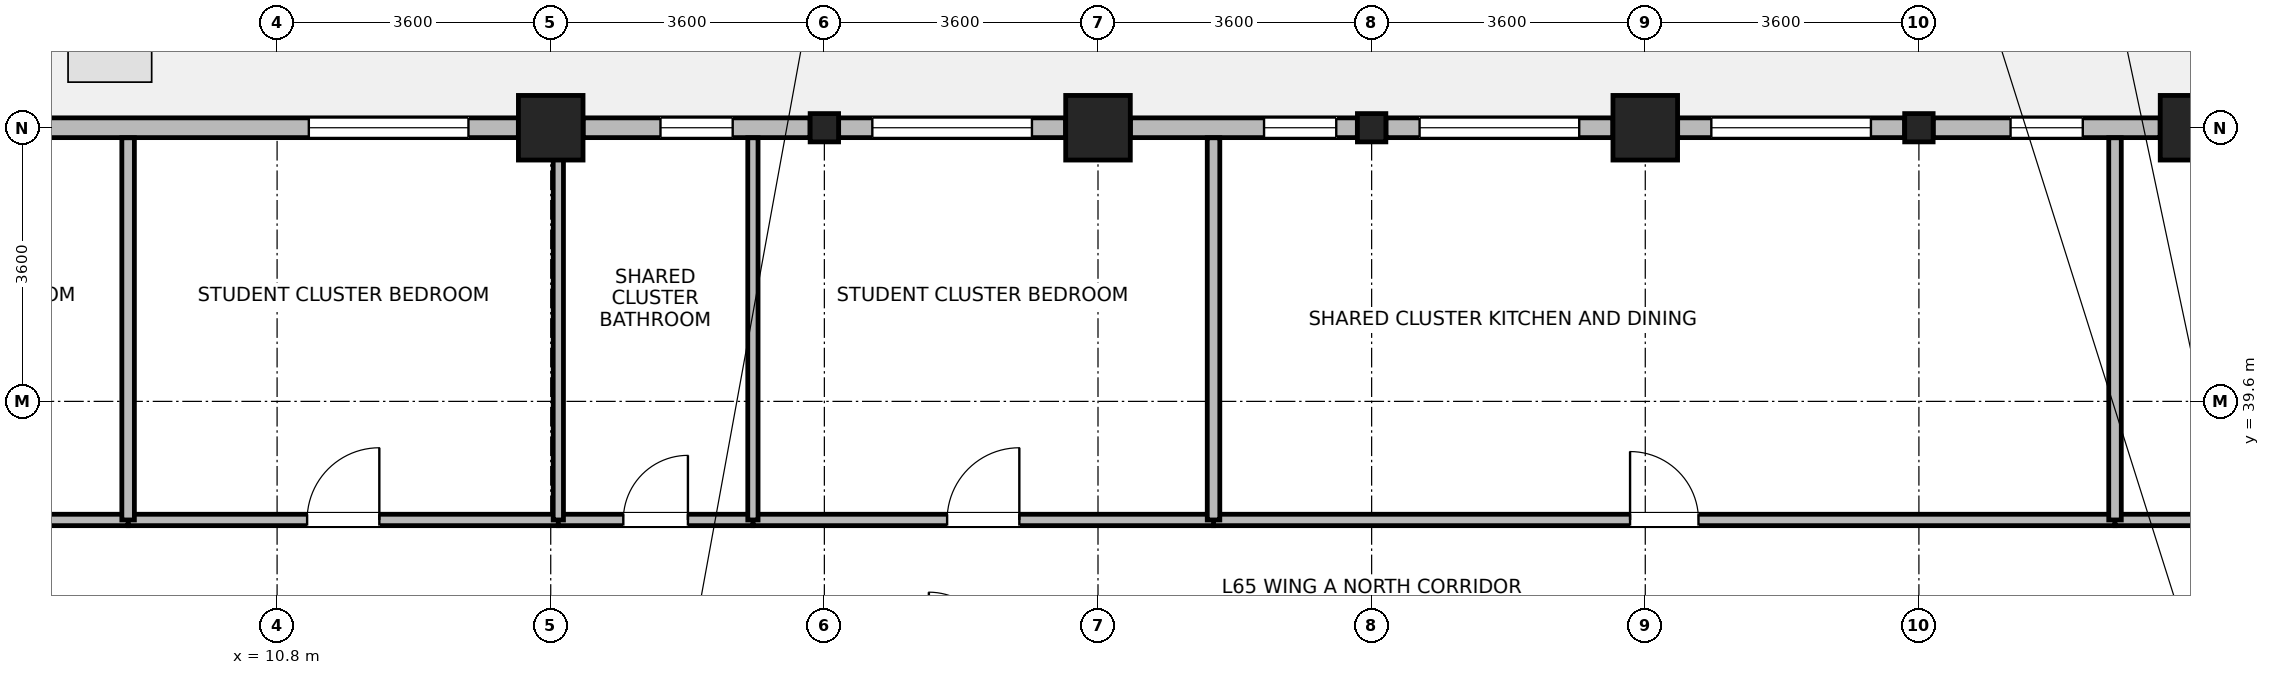
"""IFC4 building model, lengths in metres.
Left out: names, types, materials, properties, quantities, classifications, styles, units other than length and angle.
Written with IfcOpenShell. Run it as: python <this file> out.ifc"""

import sys

from ifc_helpers import new_model, si_unit, direction, frame, frame_2d, origin, origin_2d, place, context, subcontext, project, spatial, rectangle, i_section, extrude, source, transform, mapped, element, fill, save


model = new_model("IFC4")
c1 = context("Model", 3, precision=1e-05, world=origin(), true_north=direction((0.0, 1.0)))
c2 = subcontext(c1, "Body", "Model", "MODEL_VIEW")
j1 = project(units=[si_unit("LENGTHUNIT", "METRE"), si_unit("PLANEANGLEUNIT", "RADIAN")], contexts=[c1])
p1 = place(None, origin())
s1 = spatial("IfcSite", under=j1, at=p1, CompositionType="ELEMENT")
p2 = place(p1, origin())
s2 = spatial("IfcBuilding", under=s1, at=p2, CompositionType="ELEMENT")
p3 = place(p2, frame((0.0, 0.0, 253.6)))
s3 = spatial("IfcBuildingStorey", under=s2, at=p3, CompositionType="ELEMENT", Elevation=253.6)
m1 = source(origin(), c2, "Body", "SweptSolid", [
    extrude(rectangle(XDim=0.85, YDim=0.85, at=origin_2d()), origin(), (0.0, 0.0, 1.0), 3.7),
])
for number, where, z_axis, x_axis in (
    (1, (14.4, 43.2, 0.0), (0.0, 0.0, 1.0), (1.0, 0.0, 0.0)),
    (2, (21.6, 43.2, 0.0), (0.0, 0.0, 1.0), (1.0, 0.0, 0.0)),
    (3, (28.8, 43.2, 0.0), (0.0, 0.0, 1.0), (1.0, 0.0, 0.0)),
    (4, (36.0, 43.2, 0.0), (0.0, 0.0, 1.0), (1.0, 0.0, 0.0)),
):
    element("IfcColumn", number, at=place(p3, frame(where, z_axis=z_axis, x_axis=x_axis)), inside=s3, PredefinedType="COLUMN", context=c2, shape_type="MappedRepresentation", body=[
        mapped(m1, transform((0.0, 0.0, 0.0), x_axis=(1.0, 0.0, 0.0), y_axis=(0.0, 1.0, 0.0), z_axis=(0.0, 0.0, 1.0), scale=1.0)),
    ])
m2 = source(origin(), c2, "Body", "SweptSolid", [
    extrude(i_section(OverallWidth=0.374, OverallDepth=0.372, WebThickness=0.015, FlangeThickness=0.026, FilletRadius=0.015, at=origin_2d()), origin(), (0.0, 0.0, 1.0), 3.7),
])
for number, where, z_axis, x_axis in (
    (5, (18.0, 43.2, 0.0), (0.0, 0.0, 1.0), (1.0, 0.0, 0.0)),
    (6, (25.2, 43.2, 0.0), (0.0, 0.0, 1.0), (1.0, 0.0, 0.0)),
    (7, (32.4, 43.2, 0.0), (0.0, 0.0, 1.0), (1.0, 0.0, 0.0)),
):
    element("IfcColumn", number, at=place(p3, frame(where, z_axis=z_axis, x_axis=x_axis)), inside=s3, PredefinedType="COLUMN", context=c2, shape_type="MappedRepresentation", body=[
        mapped(m2, transform((0.0, 0.0, 0.0), x_axis=(1.0, 0.0, 0.0), y_axis=(0.0, 1.0, 0.0), z_axis=(0.0, 0.0, 1.0), scale=1.0)),
    ])
p4 = place(p3, frame((32.588, 43.2, 0.0), z_axis=(0.0, 0.0, 1.0), x_axis=(1.0, 0.0, 0.0)))
e8 = element("IfcWall", 8, at=p4, inside=s3, PredefinedType="STANDARD", context=c2, shape_type="SweptSolid", body=[
    extrude(rectangle(XDim=2.986, YDim=0.26, at=frame_2d((1.493, 0.0))), origin(), (0.0, 0.0, 1.0), 3.055),
])
p5 = place(p4, frame((1.018, 0.0, 0.85)))
e9 = element("IfcOpeningElement", 9, at=p5, cuts=e8, PredefinedType="OPENING", context=c2, shape_type="SweptSolid", body=[
    extrude(rectangle(XDim=0.95, YDim=1.75, at=frame_2d((0.475, 0.875))), frame((0.0, 0.14, 0.0), z_axis=(0.0, -1.0, 0.0), x_axis=(1.0, 0.0, 0.0)), (0.0, 0.0, 1.0), 0.28),
])
p6 = place(p3, frame((29.226, 43.2, 0.0), z_axis=(0.0, 0.0, 1.0), x_axis=(1.0, 0.0, 0.0)))
e10 = element("IfcWall", 10, at=p6, inside=s3, PredefinedType="STANDARD", context=c2, shape_type="SweptSolid", body=[
    extrude(rectangle(XDim=2.986, YDim=0.26, at=frame_2d((1.493, 0.0))), origin(), (0.0, 0.0, 1.0), 3.055),
])
p7 = place(p6, frame((0.443, 0.0, 0.85)))
e11 = element("IfcOpeningElement", 11, at=p7, cuts=e10, PredefinedType="OPENING", context=c2, shape_type="SweptSolid", body=[
    extrude(rectangle(XDim=2.1, YDim=1.95, at=frame_2d((1.05, 0.975))), frame((0.0, 0.14, 0.0), z_axis=(0.0, -1.0, 0.0), x_axis=(1.0, 0.0, 0.0)), (0.0, 0.0, 1.0), 0.28),
])
p8 = place(p3, frame((25.388, 43.2, 0.0), z_axis=(0.0, 0.0, 1.0), x_axis=(1.0, 0.0, 0.0)))
e12 = element("IfcWall", 12, at=p8, inside=s3, PredefinedType="STANDARD", context=c2, shape_type="SweptSolid", body=[
    extrude(rectangle(XDim=2.986, YDim=0.26, at=frame_2d((1.493, 0.0))), origin(), (0.0, 0.0, 1.0), 3.055),
])
p9 = place(p8, frame((0.443, 0.0, 0.85)))
e13 = element("IfcOpeningElement", 13, at=p9, cuts=e12, PredefinedType="OPENING", context=c2, shape_type="SweptSolid", body=[
    extrude(rectangle(XDim=2.1, YDim=1.95, at=frame_2d((1.05, 0.975))), frame((0.0, 0.14, 0.0), z_axis=(0.0, -1.0, 0.0), x_axis=(1.0, 0.0, 0.0)), (0.0, 0.0, 1.0), 0.28),
])
p10 = place(p3, frame((22.026, 43.2, 0.0), z_axis=(0.0, 0.0, 1.0), x_axis=(1.0, 0.0, 0.0)))
e14 = element("IfcWall", 14, at=p10, inside=s3, PredefinedType="STANDARD", context=c2, shape_type="SweptSolid", body=[
    extrude(rectangle(XDim=2.986, YDim=0.26, at=frame_2d((1.493, 0.0))), origin(), (0.0, 0.0, 1.0), 3.055),
])
p11 = place(p10, frame((1.759, 0.0, 0.85)))
e15 = element("IfcOpeningElement", 15, at=p11, cuts=e14, PredefinedType="OPENING", context=c2, shape_type="SweptSolid", body=[
    extrude(rectangle(XDim=0.95, YDim=1.75, at=frame_2d((0.475, 0.875))), frame((0.0, 0.14, 0.0), z_axis=(0.0, -1.0, 0.0), x_axis=(1.0, 0.0, 0.0)), (0.0, 0.0, 1.0), 0.28),
])
p12 = place(p3, frame((18.188, 43.2, 0.0), z_axis=(0.0, 0.0, 1.0), x_axis=(1.0, 0.0, 0.0)))
e16 = element("IfcWall", 16, at=p12, inside=s3, PredefinedType="STANDARD", context=c2, shape_type="SweptSolid", body=[
    extrude(rectangle(XDim=2.986, YDim=0.26, at=frame_2d((1.493, 0.0))), origin(), (0.0, 0.0, 1.0), 3.055),
])
p13 = place(p12, frame((0.443, 0.0, 0.85)))
e17 = element("IfcOpeningElement", 17, at=p13, cuts=e16, PredefinedType="OPENING", context=c2, shape_type="SweptSolid", body=[
    extrude(rectangle(XDim=2.1, YDim=1.95, at=frame_2d((1.05, 0.975))), frame((0.0, 0.14, 0.0), z_axis=(0.0, -1.0, 0.0), x_axis=(1.0, 0.0, 0.0)), (0.0, 0.0, 1.0), 0.28),
])
p14 = place(p3, frame((14.826, 43.2, 0.0), z_axis=(0.0, 0.0, 1.0), x_axis=(1.0, 0.0, 0.0)))
e18 = element("IfcWall", 18, at=p14, inside=s3, PredefinedType="STANDARD", context=c2, shape_type="SweptSolid", body=[
    extrude(rectangle(XDim=2.986, YDim=0.26, at=frame_2d((1.493, 0.0))), origin(), (0.0, 0.0, 1.0), 3.055),
])
p15 = place(p14, frame((1.018, 0.0, 0.85)))
e19 = element("IfcOpeningElement", 19, at=p15, cuts=e18, PredefinedType="OPENING", context=c2, shape_type="SweptSolid", body=[
    extrude(rectangle(XDim=0.95, YDim=1.75, at=frame_2d((0.475, 0.875))), frame((0.0, 0.14, 0.0), z_axis=(0.0, -1.0, 0.0), x_axis=(1.0, 0.0, 0.0)), (0.0, 0.0, 1.0), 0.28),
])
p16 = place(p3, frame((3.735, 43.2, 0.0), z_axis=(0.0, 0.0, 1.0), x_axis=(1.0, 0.0, 0.0)))
e20 = element("IfcWall", 20, at=p16, inside=s3, PredefinedType="STANDARD", context=c2, shape_type="SweptSolid", body=[
    extrude(rectangle(XDim=10.239, YDim=0.26, at=frame_2d((5.12, 0.0))), origin(), (0.0, 0.0, 1.0), 3.455),
])
p17 = place(p16, frame((0.656, 0.0, 0.85)))
e21 = element("IfcOpeningElement", 21, at=p17, cuts=e20, PredefinedType="OPENING", context=c2, shape_type="SweptSolid", body=[
    extrude(rectangle(XDim=2.1, YDim=1.95, at=frame_2d((1.05, 0.975))), frame((0.0, 0.14, 0.0), z_axis=(0.0, -1.0, 0.0), x_axis=(1.0, 0.0, 0.0)), (0.0, 0.0, 1.0), 0.28),
])
p18 = place(p16, frame((7.482, 0.0, 0.85)))
e22 = element("IfcOpeningElement", 22, at=p18, cuts=e20, PredefinedType="OPENING", context=c2, shape_type="SweptSolid", body=[
    extrude(rectangle(XDim=2.1, YDim=1.95, at=frame_2d((1.05, 0.975))), frame((0.0, 0.14, 0.0), z_axis=(0.0, -1.0, 0.0), x_axis=(1.0, 0.0, 0.0)), (0.0, 0.0, 1.0), 0.28),
])
p19 = place(p3, frame((23.12, 38.04, 0.0), z_axis=(0.0, 0.0, 1.0), x_axis=(1.0, 0.0, 0.0)))
e23 = element("IfcWall", 23, at=p19, inside=s3, PredefinedType="PARTITIONING", context=c2, shape_type="SweptSolid", body=[
    extrude(rectangle(XDim=11.86, YDim=0.15, at=frame_2d((5.93, 0.0))), origin(), (0.0, 0.0, 1.0), 3.455),
])
p20 = place(p19, frame((5.48, 0.0, 0.0)))
e24 = element("IfcOpeningElement", 24, at=p20, cuts=e23, PredefinedType="OPENING", context=c2, shape_type="SweptSolid", body=[
    extrude(rectangle(XDim=0.9, YDim=2.08, at=frame_2d((0.45, 1.04))), frame((0.0, 0.085, 0.0), z_axis=(0.0, -1.0, 0.0), x_axis=(1.0, 0.0, 0.0)), (0.0, 0.0, 1.0), 0.17),
])
p21 = place(p3, frame((34.98, 38.04, 0.0), z_axis=(0.0, 0.0, 1.0), x_axis=(1.0, 0.0, 0.0)))
e25 = element("IfcWall", 25, at=p21, inside=s3, PredefinedType="PARTITIONING", context=c2, shape_type="SweptSolid", body=[
    extrude(rectangle(XDim=9.96, YDim=0.15, at=frame_2d((4.98, 0.0))), origin(), (0.0, 0.0, 1.0), 3.455),
])
p22 = place(p21, frame((4.505, 0.0, 0.0)))
e26 = element("IfcOpeningElement", 26, at=p22, cuts=e25, PredefinedType="OPENING", context=c2, shape_type="SweptSolid", body=[
    extrude(rectangle(XDim=0.95, YDim=2.1, at=frame_2d((0.475, 1.05))), frame((0.0, 0.085, 0.0), z_axis=(0.0, -1.0, 0.0), x_axis=(1.0, 0.0, 0.0)), (0.0, 0.0, 1.0), 0.17),
])
p23 = place(p3, frame((17.06, 38.04, 0.0), z_axis=(0.0, 0.0, 1.0), x_axis=(1.0, 0.0, 0.0)))
e27 = element("IfcWall", 27, at=p23, inside=s3, PredefinedType="PARTITIONING", context=c2, shape_type="SweptSolid", body=[
    extrude(rectangle(XDim=6.06, YDim=0.15, at=frame_2d((3.03, 0.0))), origin(), (0.0, 0.0, 1.0), 3.455),
])
p24 = place(p23, frame((2.555, 0.0, 0.0)))
e28 = element("IfcOpeningElement", 28, at=p24, cuts=e27, PredefinedType="OPENING", context=c2, shape_type="SweptSolid", body=[
    extrude(rectangle(XDim=0.95, YDim=2.1, at=frame_2d((0.475, 1.05))), frame((0.0, 0.085, 0.0), z_axis=(0.0, -1.0, 0.0), x_axis=(1.0, 0.0, 0.0)), (0.0, 0.0, 1.0), 0.17),
])
p25 = place(p3, frame((8.84, 38.04, 0.0), z_axis=(0.0, 0.0, 1.0), x_axis=(1.0, 0.0, 0.0)))
e29 = element("IfcWall", 29, at=p25, inside=s3, PredefinedType="PARTITIONING", context=c2, shape_type="SweptSolid", body=[
    extrude(rectangle(XDim=5.66, YDim=0.15, at=frame_2d((2.83, 0.0))), origin(), (0.0, 0.0, 1.0), 3.455),
])
p26 = place(p25, frame((2.355, 0.0, 0.0)))
e30 = element("IfcOpeningElement", 30, at=p26, cuts=e29, PredefinedType="OPENING", context=c2, shape_type="SweptSolid", body=[
    extrude(rectangle(XDim=0.95, YDim=2.1, at=frame_2d((0.475, 1.05))), frame((0.0, 0.085, 0.0), z_axis=(0.0, -1.0, 0.0), x_axis=(1.0, 0.0, 0.0)), (0.0, 0.0, 1.0), 0.17),
])
p27 = place(p3, frame((3.732, 38.04, 0.0), z_axis=(0.0, 0.0, 1.0), x_axis=(1.0, 0.0, 0.0)))
e31 = element("IfcWall", 31, at=p27, inside=s3, PredefinedType="PARTITIONING", context=c2, shape_type="SweptSolid", body=[
    extrude(rectangle(XDim=5.108, YDim=0.15, at=frame_2d((2.554, 0.0))), origin(), (0.0, 0.0, 1.0), 3.455),
])
p28 = place(p27, frame((2.079, 0.0, 0.0)))
e32 = element("IfcOpeningElement", 32, at=p28, cuts=e31, PredefinedType="OPENING", context=c2, shape_type="SweptSolid", body=[
    extrude(rectangle(XDim=0.95, YDim=2.1, at=frame_2d((0.475, 1.05))), frame((0.0, 0.085, 0.0), z_axis=(0.0, -1.0, 0.0), x_axis=(1.0, 0.0, 0.0)), (0.0, 0.0, 1.0), 0.17),
])
p29 = place(p3, frame((14.5, 38.04, 0.0), z_axis=(0.0, 0.0, 1.0), x_axis=(1.0, 0.0, 0.0)))
e33 = element("IfcWall", 33, at=p29, inside=s3, PredefinedType="PARTITIONING", context=c2, shape_type="SweptSolid", body=[
    extrude(rectangle(XDim=2.56, YDim=0.15, at=frame_2d((1.28, 0.0))), origin(), (0.0, 0.0, 1.0), 3.455),
])
p30 = place(p29, frame((0.855, 0.0, 0.0)))
e34 = element("IfcOpeningElement", 34, at=p30, cuts=e33, PredefinedType="OPENING", context=c2, shape_type="SweptSolid", body=[
    extrude(rectangle(XDim=0.85, YDim=2.04, at=frame_2d((0.425, 1.02))), frame((0.0, 0.085, 0.0), z_axis=(0.0, -1.0, 0.0), x_axis=(1.0, 0.0, 0.0)), (0.0, 0.0, 1.0), 0.17),
])
p31 = place(p3, frame((8.84, 38.04, 0.0), z_axis=(0.0, 0.0, 1.0), x_axis=(0.0, 1.0, 0.0)))
e35 = element("IfcWall", 35, at=p31, inside=s3, PredefinedType="PARTITIONING", context=c2, shape_type="SweptSolid", body=[
    extrude(rectangle(XDim=5.028, YDim=0.165, at=frame_2d((2.514, 0.0))), origin(), (0.0, 0.0, 1.0), 3.455),
])
p32 = place(p3, frame((14.5, 38.04, 0.0), z_axis=(0.0, 0.0, 1.0), x_axis=(0.0, 1.0, 0.0)))
e36 = element("IfcWall", 36, at=p32, inside=s3, PredefinedType="PARTITIONING", context=c2, shape_type="SweptSolid", body=[
    extrude(rectangle(XDim=5.028, YDim=0.135, at=frame_2d((2.514, 0.0))), origin(), (0.0, 0.0, 1.0), 3.055),
])
p33 = place(p3, frame((17.06, 38.04, 0.0), z_axis=(0.0, 0.0, 1.0), x_axis=(0.0, 1.0, 0.0)))
e37 = element("IfcWall", 37, at=p33, inside=s3, PredefinedType="PARTITIONING", context=c2, shape_type="SweptSolid", body=[
    extrude(rectangle(XDim=5.028, YDim=0.135, at=frame_2d((2.514, 0.0))), origin(), (0.0, 0.0, 1.0), 3.455),
])
for number, where, z_axis, x_axis in (
    (38, (23.12, 38.04, 0.0), (0.0, 0.0, 1.0), (0.0, 1.0, 0.0)),
    (39, (34.98, 38.04, 0.0), (0.0, 0.0, 1.0), (0.0, 1.0, 0.0)),
):
    element("IfcWall", number, at=place(p3, frame(where, z_axis=z_axis, x_axis=x_axis)), inside=s3, PredefinedType="PARTITIONING", context=c2, shape_type="SweptSolid", body=[
        extrude(rectangle(XDim=5.028, YDim=0.165, at=frame_2d((2.514, 0.0))), origin(), (0.0, 0.0, 1.0), 3.455),
    ])
p34 = place(p5, origin())
e40 = element("IfcWindow", 40, at=p34, inside=s3, PartitioningType="SINGLE_PANEL", PredefinedType="WINDOW", context=c2, shape_type="SweptSolid", body=[
    extrude(rectangle(XDim=0.95, YDim=1.75, at=frame_2d((0.475, 0.875))), frame((0.0, 0.03, 0.0), z_axis=(0.0, -1.0, 0.0), x_axis=(1.0, 0.0, 0.0)), (0.0, 0.0, 1.0), 0.06),
])
fill(e9, e40)
p35 = place(p7, origin())
e41 = element("IfcWindow", 41, at=p35, inside=s3, PartitioningType="SINGLE_PANEL", PredefinedType="WINDOW", context=c2, shape_type="SweptSolid", body=[
    extrude(rectangle(XDim=2.1, YDim=1.95, at=frame_2d((1.05, 0.975))), frame((0.0, 0.03, 0.0), z_axis=(0.0, -1.0, 0.0), x_axis=(1.0, 0.0, 0.0)), (0.0, 0.0, 1.0), 0.06),
])
fill(e11, e41)
p36 = place(p9, origin())
e42 = element("IfcWindow", 42, at=p36, inside=s3, PartitioningType="SINGLE_PANEL", PredefinedType="WINDOW", context=c2, shape_type="SweptSolid", body=[
    extrude(rectangle(XDim=2.1, YDim=1.95, at=frame_2d((1.05, 0.975))), frame((0.0, 0.03, 0.0), z_axis=(0.0, -1.0, 0.0), x_axis=(1.0, 0.0, 0.0)), (0.0, 0.0, 1.0), 0.06),
])
fill(e13, e42)
p37 = place(p11, origin())
e43 = element("IfcWindow", 43, at=p37, inside=s3, PartitioningType="SINGLE_PANEL", PredefinedType="WINDOW", context=c2, shape_type="SweptSolid", body=[
    extrude(rectangle(XDim=0.95, YDim=1.75, at=frame_2d((0.475, 0.875))), frame((0.0, 0.03, 0.0), z_axis=(0.0, -1.0, 0.0), x_axis=(1.0, 0.0, 0.0)), (0.0, 0.0, 1.0), 0.06),
])
fill(e15, e43)
p38 = place(p13, origin())
e44 = element("IfcWindow", 44, at=p38, inside=s3, PartitioningType="SINGLE_PANEL", PredefinedType="WINDOW", context=c2, shape_type="SweptSolid", body=[
    extrude(rectangle(XDim=2.1, YDim=1.95, at=frame_2d((1.05, 0.975))), frame((0.0, 0.03, 0.0), z_axis=(0.0, -1.0, 0.0), x_axis=(1.0, 0.0, 0.0)), (0.0, 0.0, 1.0), 0.06),
])
fill(e17, e44)
p39 = place(p15, origin())
e45 = element("IfcWindow", 45, at=p39, inside=s3, PartitioningType="SINGLE_PANEL", PredefinedType="WINDOW", context=c2, shape_type="SweptSolid", body=[
    extrude(rectangle(XDim=0.95, YDim=1.75, at=frame_2d((0.475, 0.875))), frame((0.0, 0.03, 0.0), z_axis=(0.0, -1.0, 0.0), x_axis=(1.0, 0.0, 0.0)), (0.0, 0.0, 1.0), 0.06),
])
fill(e19, e45)
p40 = place(p18, origin())
e46 = element("IfcWindow", 46, at=p40, inside=s3, PartitioningType="SINGLE_PANEL", PredefinedType="WINDOW", context=c2, shape_type="SweptSolid", body=[
    extrude(rectangle(XDim=2.1, YDim=1.95, at=frame_2d((1.05, 0.975))), frame((0.0, 0.03, 0.0), z_axis=(0.0, -1.0, 0.0), x_axis=(1.0, 0.0, 0.0)), (0.0, 0.0, 1.0), 0.06),
])
fill(e22, e46)
p41 = place(p20, origin())
e47 = element("IfcDoor", 47, at=p41, inside=s3, OperationType="SINGLE_SWING_LEFT", PredefinedType="DOOR", context=c2, shape_type="SweptSolid", body=[
    extrude(rectangle(XDim=0.9, YDim=2.08, at=frame_2d((0.45, 1.04))), frame((0.0, 0.025, 0.0), z_axis=(0.0, -1.0, 0.0), x_axis=(1.0, 0.0, 0.0)), (0.0, 0.0, 1.0), 0.05),
])
fill(e24, e47)
p42 = place(p24, origin())
e48 = element("IfcDoor", 48, at=p42, inside=s3, OperationType="SINGLE_SWING_RIGHT", PredefinedType="DOOR", context=c2, shape_type="SweptSolid", body=[
    extrude(rectangle(XDim=0.95, YDim=2.1, at=frame_2d((0.475, 1.05))), frame((0.0, 0.025, 0.0), z_axis=(0.0, -1.0, 0.0), x_axis=(1.0, 0.0, 0.0)), (0.0, 0.0, 1.0), 0.05),
])
fill(e28, e48)
p43 = place(p26, origin())
e49 = element("IfcDoor", 49, at=p43, inside=s3, OperationType="SINGLE_SWING_RIGHT", PredefinedType="DOOR", context=c2, shape_type="SweptSolid", body=[
    extrude(rectangle(XDim=0.95, YDim=2.1, at=frame_2d((0.475, 1.05))), frame((0.0, 0.025, 0.0), z_axis=(0.0, -1.0, 0.0), x_axis=(1.0, 0.0, 0.0)), (0.0, 0.0, 1.0), 0.05),
])
fill(e30, e49)
p44 = place(p30, origin())
e50 = element("IfcDoor", 50, at=p44, inside=s3, OperationType="SINGLE_SWING_RIGHT", PredefinedType="DOOR", context=c2, shape_type="SweptSolid", body=[
    extrude(rectangle(XDim=0.85, YDim=2.04, at=frame_2d((0.425, 1.02))), frame((0.0, 0.025, 0.0), z_axis=(0.0, -1.0, 0.0), x_axis=(1.0, 0.0, 0.0)), (0.0, 0.0, 1.0), 0.05),
])
fill(e34, e50)
save(model, sys.argv[1])
